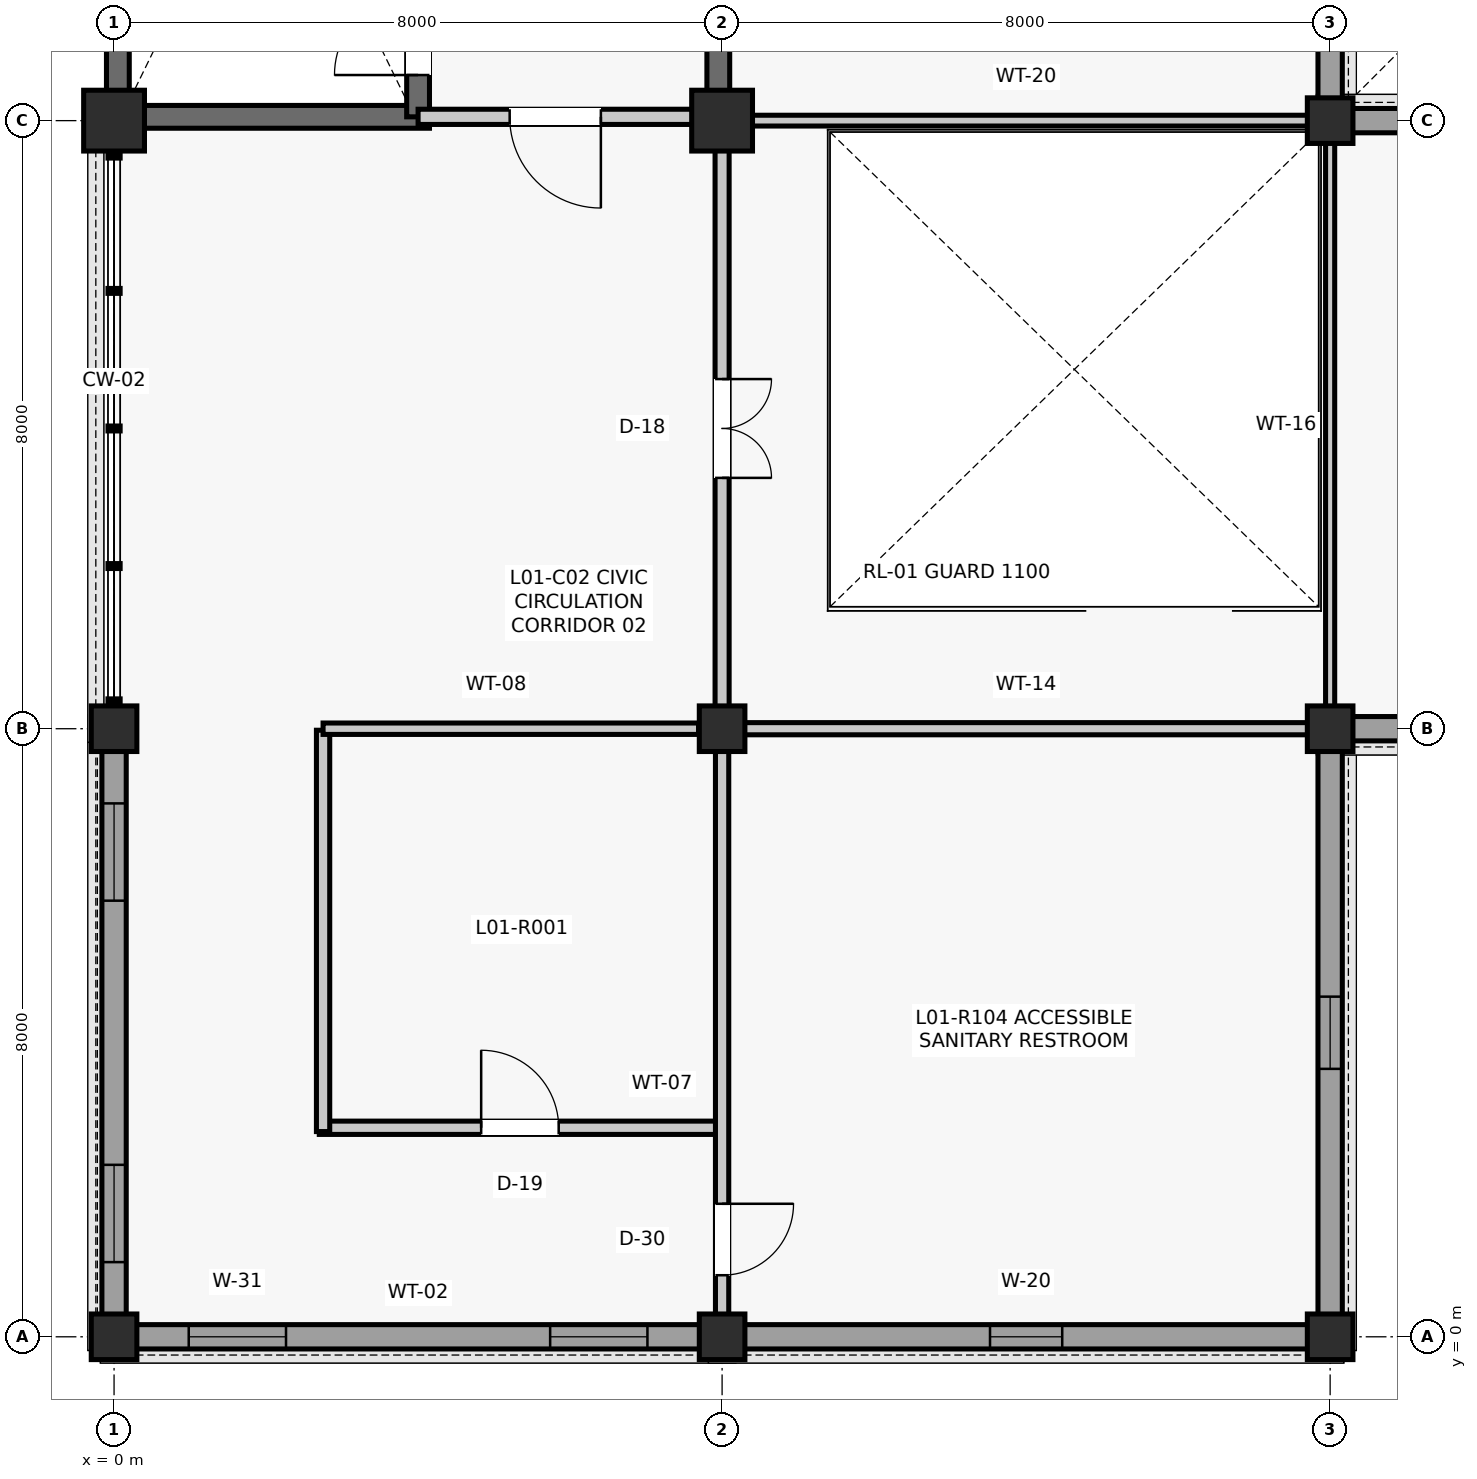
"""IFC4 building model, lengths in metres.
Left out: names, types, materials, properties, quantities, classifications, styles, units other than length and angle.
Written with IfcOpenShell. Run it as: python <this file> out.ifc"""

import sys

from ifc_helpers import new_model, si_unit, direction, frame, frame_2d, origin, origin_2d, place, context, subcontext, project, spatial, rectangle, extrude, element, fill, save


model = new_model("IFC4")
c1 = context("Model", 3, precision=1e-05, world=origin(), true_north=direction((0.0, 1.0)))
c2 = subcontext(c1, "Body", "Model", "MODEL_VIEW")
j1 = project(units=[si_unit("LENGTHUNIT", "METRE"), si_unit("PLANEANGLEUNIT", "RADIAN")], contexts=[c1])
p1 = place(None, origin())
s1 = spatial("IfcSite", under=j1, at=p1, CompositionType="ELEMENT")
p2 = place(p1, origin())
s2 = spatial("IfcBuilding", under=s1, at=p2, CompositionType="ELEMENT")
p3 = place(p2, frame((0.0, 0.0, 5.28)))
s3 = spatial("IfcBuildingStorey", under=s2, at=p3, CompositionType="ELEMENT", Elevation=5.28)
for number, where, z_axis, x_axis in (
    (1, (0.0, 0.0, 0.0), (0.0, 0.0, 1.0), (1.0, 0.0, 0.0)),
    (2, (0.0, 8.0, 0.0), (0.0, 0.0, 1.0), (1.0, 0.0, 0.0)),
):
    element("IfcColumn", number, at=place(p3, frame(where, z_axis=z_axis, x_axis=x_axis)), inside=s3, PredefinedType="COLUMN", context=c2, shape_type="SweptSolid", body=[
        extrude(rectangle(XDim=0.6, YDim=0.6, at=origin_2d()), origin(), (0.0, 0.0, 1.0), 4.62),
    ])
p4 = place(p3, frame((0.0, 16.0, 0.0), z_axis=(0.0, 0.0, 1.0), x_axis=(1.0, 0.0, 0.0)))
e3 = element("IfcColumn", 3, at=p4, inside=s3, PredefinedType="COLUMN", context=c2, shape_type="SweptSolid", body=[
    extrude(rectangle(XDim=0.8, YDim=0.8, at=origin_2d()), origin(), (0.0, 0.0, 1.0), 4.62),
])
for number, where, z_axis, x_axis in (
    (4, (8.0, 0.0, 0.0), (0.0, 0.0, 1.0), (1.0, 0.0, 0.0)),
    (5, (8.0, 8.0, 0.0), (0.0, 0.0, 1.0), (1.0, 0.0, 0.0)),
):
    element("IfcColumn", number, at=place(p3, frame(where, z_axis=z_axis, x_axis=x_axis)), inside=s3, PredefinedType="COLUMN", context=c2, shape_type="SweptSolid", body=[
        extrude(rectangle(XDim=0.6, YDim=0.6, at=origin_2d()), origin(), (0.0, 0.0, 1.0), 4.62),
    ])
p5 = place(p3, frame((8.0, 16.0, 0.0), z_axis=(0.0, 0.0, 1.0), x_axis=(1.0, 0.0, 0.0)))
e6 = element("IfcColumn", 6, at=p5, inside=s3, PredefinedType="COLUMN", context=c2, shape_type="SweptSolid", body=[
    extrude(rectangle(XDim=0.8, YDim=0.8, at=origin_2d()), origin(), (0.0, 0.0, 1.0), 4.62),
])
for number, where, z_axis, x_axis in (
    (7, (16.0, 0.0, 0.0), (0.0, 0.0, 1.0), (1.0, 0.0, 0.0)),
    (8, (16.0, 8.0, 0.0), (0.0, 0.0, 1.0), (1.0, 0.0, 0.0)),
    (9, (16.0, 16.0, 0.0), (0.0, 0.0, 1.0), (1.0, 0.0, 0.0)),
):
    element("IfcColumn", number, at=place(p3, frame(where, z_axis=z_axis, x_axis=x_axis)), inside=s3, PredefinedType="COLUMN", context=c2, shape_type="SweptSolid", body=[
        extrude(rectangle(XDim=0.6, YDim=0.6, at=origin_2d()), origin(), (0.0, 0.0, 1.0), 4.62),
    ])
p6 = place(p3, frame((0.285, 0.0, 0.0), z_axis=(0.0, 0.0, 1.0), x_axis=(1.0, 0.0, 0.0)))
e10 = element("IfcWall", 10, at=p6, inside=s3, PredefinedType="SOLIDWALL", context=c2, shape_type="SweptSolid", body=[
    extrude(rectangle(XDim=7.43, YDim=0.32, at=frame_2d((3.715, 0.0))), origin(), (0.0, 0.0, 1.0), 3.974),
])
p7 = place(p6, frame((0.698, 0.0, 0.95)))
e11 = element("IfcOpeningElement", 11, at=p7, cuts=e10, PredefinedType="OPENING", context=c2, shape_type="SweptSolid", body=[
    extrude(rectangle(XDim=1.28, YDim=1.72, at=frame_2d((0.64, 0.86))), frame((0.0, 0.17, 0.0), z_axis=(0.0, -1.0, 0.0), x_axis=(1.0, 0.0, 0.0)), (0.0, 0.0, 1.0), 0.34),
])
p8 = place(p6, frame((5.453, 0.0, 0.95)))
e12 = element("IfcOpeningElement", 12, at=p8, cuts=e10, PredefinedType="OPENING", context=c2, shape_type="SweptSolid", body=[
    extrude(rectangle(XDim=1.28, YDim=1.72, at=frame_2d((0.64, 0.86))), frame((0.0, 0.17, 0.0), z_axis=(0.0, -1.0, 0.0), x_axis=(1.0, 0.0, 0.0)), (0.0, 0.0, 1.0), 0.34),
])
p9 = place(p3, frame((0.0, 0.285, 0.0), z_axis=(0.0, 0.0, 1.0), x_axis=(0.0, 1.0, 0.0)))
e13 = element("IfcWall", 13, at=p9, inside=s3, PredefinedType="SOLIDWALL", context=c2, shape_type="SweptSolid", body=[
    extrude(rectangle(XDim=7.43, YDim=0.32, at=frame_2d((3.715, 0.0))), origin(), (0.0, 0.0, 1.0), 3.974),
])
p10 = place(p9, frame((0.698, 0.0, 0.95)))
e14 = element("IfcOpeningElement", 14, at=p10, cuts=e13, PredefinedType="OPENING", context=c2, shape_type="SweptSolid", body=[
    extrude(rectangle(XDim=1.28, YDim=1.72, at=frame_2d((0.64, 0.86))), frame((0.0, 0.17, 0.0), z_axis=(0.0, -1.0, 0.0), x_axis=(1.0, 0.0, 0.0)), (0.0, 0.0, 1.0), 0.34),
])
p11 = place(p9, frame((5.453, 0.0, 0.95)))
e15 = element("IfcOpeningElement", 15, at=p11, cuts=e13, PredefinedType="OPENING", context=c2, shape_type="SweptSolid", body=[
    extrude(rectangle(XDim=1.28, YDim=1.72, at=frame_2d((0.64, 0.86))), frame((0.0, 0.17, 0.0), z_axis=(0.0, -1.0, 0.0), x_axis=(1.0, 0.0, 0.0)), (0.0, 0.0, 1.0), 0.34),
])
p12 = place(p3, frame((8.285, 0.0, 0.0), z_axis=(0.0, 0.0, 1.0), x_axis=(1.0, 0.0, 0.0)))
e16 = element("IfcWall", 16, at=p12, inside=s3, PredefinedType="SOLIDWALL", context=c2, shape_type="SweptSolid", body=[
    extrude(rectangle(XDim=7.43, YDim=0.32, at=frame_2d((3.715, 0.0))), origin(), (0.0, 0.0, 1.0), 3.914),
])
p13 = place(p12, frame((3.24, 0.0, 1.35)))
e17 = element("IfcOpeningElement", 17, at=p13, cuts=e16, PredefinedType="OPENING", context=c2, shape_type="SweptSolid", body=[
    extrude(rectangle(XDim=0.95, YDim=1.4, at=frame_2d((0.475, 0.7))), frame((0.0, 0.17, 0.0), z_axis=(0.0, -1.0, 0.0), x_axis=(1.0, 0.0, 0.0)), (0.0, 0.0, 1.0), 0.34),
])
p14 = place(p3, frame((16.0, 0.285, 0.0), z_axis=(0.0, 0.0, 1.0), x_axis=(0.0, 1.0, 0.0)))
e18 = element("IfcWall", 18, at=p14, inside=s3, PredefinedType="SOLIDWALL", context=c2, shape_type="SweptSolid", body=[
    extrude(rectangle(XDim=7.43, YDim=0.32, at=frame_2d((3.715, 0.0))), origin(), (0.0, 0.0, 1.0), 3.977),
])
p15 = place(p14, frame((3.24, 0.0, 1.35)))
e19 = element("IfcOpeningElement", 19, at=p15, cuts=e18, PredefinedType="OPENING", context=c2, shape_type="SweptSolid", body=[
    extrude(rectangle(XDim=0.95, YDim=1.4, at=frame_2d((0.475, 0.7))), frame((0.0, 0.17, 0.0), z_axis=(0.0, -1.0, 0.0), x_axis=(1.0, 0.0, 0.0)), (0.0, 0.0, 1.0), 0.34),
])
p16 = place(p3, frame((16.0, 16.285, 0.0), z_axis=(0.0, 0.0, 1.0), x_axis=(0.0, 1.0, 0.0)))
e20 = element("IfcWall", 20, at=p16, inside=s3, PredefinedType="SOLIDWALL", context=c2, shape_type="SweptSolid", body=[
    extrude(rectangle(XDim=7.43, YDim=0.32, at=frame_2d((3.715, 0.0))), origin(), (0.0, 0.0, 1.0), 3.974),
])
p17 = place(p16, frame((2.74, 0.0, 0.9)))
e21 = element("IfcOpeningElement", 21, at=p17, cuts=e20, PredefinedType="OPENING", context=c2, shape_type="SweptSolid", body=[
    extrude(rectangle(XDim=1.95, YDim=2.45, at=frame_2d((0.975, 1.225))), frame((0.0, 0.17, 0.0), z_axis=(0.0, -1.0, 0.0), x_axis=(1.0, 0.0, 0.0)), (0.0, 0.0, 1.0), 0.34),
])
p18 = place(p3, frame((16.285, 8.0, 0.0), z_axis=(0.0, 0.0, 1.0), x_axis=(1.0, 0.0, 0.0)))
e22 = element("IfcWall", 22, at=p18, inside=s3, PredefinedType="SOLIDWALL", context=c2, shape_type="SweptSolid", body=[
    extrude(rectangle(XDim=7.43, YDim=0.32, at=frame_2d((3.715, 0.0))), origin(), (0.0, 0.0, 1.0), 3.91),
])
p19 = place(p18, frame((2.74, 0.0, 0.9)))
e23 = element("IfcOpeningElement", 23, at=p19, cuts=e22, PredefinedType="OPENING", context=c2, shape_type="SweptSolid", body=[
    extrude(rectangle(XDim=1.95, YDim=2.45, at=frame_2d((0.975, 1.225))), frame((0.0, 0.17, 0.0), z_axis=(0.0, -1.0, 0.0), x_axis=(1.0, 0.0, 0.0)), (0.0, 0.0, 1.0), 0.34),
])
p20 = place(p3, frame((16.285, 16.0, 0.0), z_axis=(0.0, 0.0, 1.0), x_axis=(1.0, 0.0, 0.0)))
e24 = element("IfcWall", 24, at=p20, inside=s3, PredefinedType="SOLIDWALL", context=c2, shape_type="SweptSolid", body=[
    extrude(rectangle(XDim=7.43, YDim=0.32, at=frame_2d((3.715, 0.0))), origin(), (0.0, 0.0, 1.0), 3.974),
])
p21 = place(p20, frame((2.74, 0.0, 0.9)))
e25 = element("IfcOpeningElement", 25, at=p21, cuts=e24, PredefinedType="OPENING", context=c2, shape_type="SweptSolid", body=[
    extrude(rectangle(XDim=1.95, YDim=2.45, at=frame_2d((0.975, 1.225))), frame((0.0, 0.17, 0.0), z_axis=(0.0, -1.0, 0.0), x_axis=(1.0, 0.0, 0.0)), (0.0, 0.0, 1.0), 0.34),
])
for number, where, z_axis, x_axis in (
    (26, (0.05, 16.29, 0.0), (0.0, 0.0, 1.0), (0.0, 1.0, 0.0)),
    (27, (7.95, 16.29, 0.0), (0.0, 0.0, 1.0), (0.0, 1.0, 0.0)),
):
    element("IfcWall", number, at=place(p3, frame(where, z_axis=z_axis, x_axis=x_axis)), inside=s3, PredefinedType="SHEAR", context=c2, shape_type="SweptSolid", body=[
        extrude(rectangle(XDim=7.42, YDim=0.3, at=frame_2d((3.71, 0.0))), origin(), (0.0, 0.0, 1.0), 4.335),
    ])
p22 = place(p3, frame((0.29, 16.05, 0.0), z_axis=(0.0, 0.0, 1.0), x_axis=(1.0, 0.0, 0.0)))
e28 = element("IfcWall", 28, at=p22, inside=s3, PredefinedType="SHEAR", context=c2, shape_type="SweptSolid", body=[
    extrude(rectangle(XDim=3.86, YDim=0.3, at=frame_2d((1.93, 0.0))), origin(), (0.0, 0.0, 1.0), 4.335),
])
p23 = place(p3, frame((4.0, 16.05, 0.0), z_axis=(0.0, 0.0, 1.0), x_axis=(0.0, 1.0, 0.0)))
e29 = element("IfcWall", 29, at=p23, inside=s3, PredefinedType="SHEAR", context=c2, shape_type="SweptSolid", body=[
    extrude(rectangle(XDim=7.9, YDim=0.3, at=frame_2d((3.95, 0.0))), origin(), (0.0, 0.0, 1.0), 4.335),
])
p24 = place(p23, frame((0.55, 0.0, 0.0)))
e30 = element("IfcOpeningElement", 30, at=p24, cuts=e29, PredefinedType="OPENING", context=c2, shape_type="SweptSolid", body=[
    extrude(rectangle(XDim=1.1, YDim=2.15, at=frame_2d((0.55, 1.075))), frame((0.0, 0.16, 0.0), z_axis=(0.0, -1.0, 0.0), x_axis=(1.0, 0.0, 0.0)), (0.0, 0.0, 1.0), 0.32),
])
p25 = place(p3, frame((4.0, 16.05, 0.0), z_axis=(0.0, 0.0, 1.0), x_axis=(1.0, 0.0, 0.0)))
e31 = element("IfcWall", 31, at=p25, inside=s3, PredefinedType="PARTITIONING", context=c2, shape_type="SweptSolid", body=[
    extrude(rectangle(XDim=3.61, YDim=0.2, at=frame_2d((1.805, 0.0))), origin(), (0.0, 0.0, 1.0), 3.771),
])
p26 = place(p25, frame((1.205, 0.0, 0.0)))
e32 = element("IfcOpeningElement", 32, at=p26, cuts=e31, PredefinedType="OPENING", context=c2, shape_type="SweptSolid", body=[
    extrude(rectangle(XDim=1.2, YDim=2.15, at=frame_2d((0.6, 1.075))), frame((0.0, 0.11, 0.0), z_axis=(0.0, -1.0, 0.0), x_axis=(1.0, 0.0, 0.0)), (0.0, 0.0, 1.0), 0.22),
])
p27 = place(p3, frame((2.7, 2.75, 0.0), z_axis=(0.0, 0.0, 1.0), x_axis=(1.0, 0.0, 0.0)))
e33 = element("IfcWall", 33, at=p27, inside=s3, PredefinedType="PARTITIONING", context=c2, shape_type="SweptSolid", body=[
    extrude(rectangle(XDim=5.28, YDim=0.175, at=frame_2d((2.64, 0.0))), origin(), (0.0, 0.0, 1.0), 3.857),
])
p28 = place(p27, frame((2.13, 0.0, 0.0)))
e34 = element("IfcOpeningElement", 34, at=p28, cuts=e33, PredefinedType="OPENING", context=c2, shape_type="SweptSolid", body=[
    extrude(rectangle(XDim=1.02, YDim=2.2, at=frame_2d((0.51, 1.1))), frame((0.0, 0.097, 0.0), z_axis=(0.0, -1.0, 0.0), x_axis=(1.0, 0.0, 0.0)), (0.0, 0.0, 1.0), 0.195),
])
p29 = place(p3, frame((2.75, 2.7, 0.0), z_axis=(0.0, 0.0, 1.0), x_axis=(0.0, 1.0, 0.0)))
e35 = element("IfcWall", 35, at=p29, inside=s3, PredefinedType="PARTITIONING", context=c2, shape_type="SweptSolid", body=[
    extrude(rectangle(XDim=5.28, YDim=0.175, at=frame_2d((2.64, 0.0))), origin(), (0.0, 0.0, 1.0), 3.787),
])
p30 = place(p3, frame((2.75, 8.0, 0.0), z_axis=(0.0, 0.0, 1.0), x_axis=(1.0, 0.0, 0.0)))
e36 = element("IfcWall", 36, at=p30, inside=s3, PredefinedType="PARTITIONING", context=c2, shape_type="SweptSolid", body=[
    extrude(rectangle(XDim=4.94, YDim=0.15, at=frame_2d((2.47, 0.0))), origin(), (0.0, 0.0, 1.0), 3.787),
])
p31 = place(p3, frame((8.0, 0.29, 0.0), z_axis=(0.0, 0.0, 1.0), x_axis=(0.0, 1.0, 0.0)))
e37 = element("IfcWall", 37, at=p31, inside=s3, PredefinedType="PARTITIONING", context=c2, shape_type="SweptSolid", body=[
    extrude(rectangle(XDim=7.42, YDim=0.175, at=frame_2d((3.71, 0.0))), origin(), (0.0, 0.0, 1.0), 3.857),
])
p32 = place(p31, frame((0.52, 0.0, 0.0)))
e38 = element("IfcOpeningElement", 38, at=p32, cuts=e37, PredefinedType="OPENING", context=c2, shape_type="SweptSolid", body=[
    extrude(rectangle(XDim=0.94, YDim=2.12, at=frame_2d((0.47, 1.06))), frame((0.0, 0.097, 0.0), z_axis=(0.0, -1.0, 0.0), x_axis=(1.0, 0.0, 0.0)), (0.0, 0.0, 1.0), 0.195),
])
p33 = place(p3, frame((8.0, 8.29, 0.0), z_axis=(0.0, 0.0, 1.0), x_axis=(0.0, 1.0, 0.0)))
e39 = element("IfcWall", 39, at=p33, inside=s3, PredefinedType="PARTITIONING", context=c2, shape_type="SweptSolid", body=[
    extrude(rectangle(XDim=7.32, YDim=0.185, at=frame_2d((3.66, 0.0))), origin(), (0.0, 0.0, 1.0), 3.781),
])
p34 = place(p33, frame((3.01, 0.0, 0.0)))
e40 = element("IfcOpeningElement", 40, at=p34, cuts=e39, PredefinedType="OPENING", context=c2, shape_type="SweptSolid", body=[
    extrude(rectangle(XDim=1.3, YDim=2.2, at=frame_2d((0.65, 1.1))), frame((0.0, 0.103, 0.0), z_axis=(0.0, -1.0, 0.0), x_axis=(1.0, 0.0, 0.0)), (0.0, 0.0, 1.0), 0.205),
])
p35 = place(p3, frame((8.29, 8.0, 0.0), z_axis=(0.0, 0.0, 1.0), x_axis=(1.0, 0.0, 0.0)))
e41 = element("IfcWall", 41, at=p35, inside=s3, PredefinedType="PARTITIONING", context=c2, shape_type="SweptSolid", body=[
    extrude(rectangle(XDim=7.42, YDim=0.16, at=frame_2d((3.71, 0.0))), origin(), (0.0, 0.0, 1.0), 3.771),
])
p36 = place(p3, frame((16.0, 8.29, 0.0), z_axis=(0.0, 0.0, 1.0), x_axis=(0.0, 1.0, 0.0)))
e42 = element("IfcWall", 42, at=p36, inside=s3, PredefinedType="PARTITIONING", context=c2, shape_type="SweptSolid", body=[
    extrude(rectangle(XDim=7.42, YDim=0.12, at=frame_2d((3.71, 0.0))), origin(), (0.0, 0.0, 1.0), 3.851),
])
p37 = place(p3, frame((8.39, 16.0, 0.0), z_axis=(0.0, 0.0, 1.0), x_axis=(1.0, 0.0, 0.0)))
e43 = element("IfcWall", 43, at=p37, inside=s3, PredefinedType="PARTITIONING", context=c2, shape_type="SweptSolid", body=[
    extrude(rectangle(XDim=7.32, YDim=0.142, at=frame_2d((3.66, 0.0))), origin(), (0.0, 0.0, 1.0), 3.781),
])
p38 = place(p7, origin())
e44 = element("IfcWindow", 44, at=p38, inside=s3, PartitioningType="SINGLE_PANEL", PredefinedType="WINDOW", context=c2, shape_type="SweptSolid", body=[
    extrude(rectangle(XDim=1.28, YDim=1.72, at=frame_2d((0.64, 0.86))), frame((0.0, 0.03, 0.0), z_axis=(0.0, -1.0, 0.0), x_axis=(1.0, 0.0, 0.0)), (0.0, 0.0, 1.0), 0.06),
])
fill(e11, e44)
p39 = place(p8, origin())
e45 = element("IfcWindow", 45, at=p39, inside=s3, PartitioningType="SINGLE_PANEL", PredefinedType="WINDOW", context=c2, shape_type="SweptSolid", body=[
    extrude(rectangle(XDim=1.28, YDim=1.72, at=frame_2d((0.64, 0.86))), frame((0.0, 0.03, 0.0), z_axis=(0.0, -1.0, 0.0), x_axis=(1.0, 0.0, 0.0)), (0.0, 0.0, 1.0), 0.06),
])
fill(e12, e45)
p40 = place(p10, origin())
e46 = element("IfcWindow", 46, at=p40, inside=s3, PartitioningType="SINGLE_PANEL", PredefinedType="WINDOW", context=c2, shape_type="SweptSolid", body=[
    extrude(rectangle(XDim=1.28, YDim=1.72, at=frame_2d((0.64, 0.86))), frame((0.0, 0.03, 0.0), z_axis=(0.0, -1.0, 0.0), x_axis=(1.0, 0.0, 0.0)), (0.0, 0.0, 1.0), 0.06),
])
fill(e14, e46)
p41 = place(p11, origin())
e47 = element("IfcWindow", 47, at=p41, inside=s3, PartitioningType="SINGLE_PANEL", PredefinedType="WINDOW", context=c2, shape_type="SweptSolid", body=[
    extrude(rectangle(XDim=1.28, YDim=1.72, at=frame_2d((0.64, 0.86))), frame((0.0, 0.03, 0.0), z_axis=(0.0, -1.0, 0.0), x_axis=(1.0, 0.0, 0.0)), (0.0, 0.0, 1.0), 0.06),
])
fill(e15, e47)
p42 = place(p13, origin())
e48 = element("IfcWindow", 48, at=p42, inside=s3, PartitioningType="SINGLE_PANEL", PredefinedType="WINDOW", context=c2, shape_type="SweptSolid", body=[
    extrude(rectangle(XDim=0.95, YDim=1.4, at=frame_2d((0.475, 0.7))), frame((0.0, 0.03, 0.0), z_axis=(0.0, -1.0, 0.0), x_axis=(1.0, 0.0, 0.0)), (0.0, 0.0, 1.0), 0.06),
])
fill(e17, e48)
p43 = place(p15, origin())
e49 = element("IfcWindow", 49, at=p43, inside=s3, PartitioningType="SINGLE_PANEL", PredefinedType="WINDOW", context=c2, shape_type="SweptSolid", body=[
    extrude(rectangle(XDim=0.95, YDim=1.4, at=frame_2d((0.475, 0.7))), frame((0.0, 0.03, 0.0), z_axis=(0.0, -1.0, 0.0), x_axis=(1.0, 0.0, 0.0)), (0.0, 0.0, 1.0), 0.06),
])
fill(e19, e49)
p44 = place(p24, origin())
e50 = element("IfcDoor", 50, at=p44, inside=s3, OperationType="SINGLE_SWING_LEFT", PredefinedType="DOOR", context=c2, shape_type="SweptSolid", body=[
    extrude(rectangle(XDim=1.1, YDim=2.15, at=frame_2d((0.55, 1.075))), frame((0.0, 0.025, 0.0), z_axis=(0.0, -1.0, 0.0), x_axis=(1.0, 0.0, 0.0)), (0.0, 0.0, 1.0), 0.05),
])
fill(e30, e50)
p45 = place(p26, frame((1.2, 0.0, 0.0), z_axis=(0.0, 0.0, 1.0), x_axis=(-1.0, 0.0, 0.0)))
e51 = element("IfcDoor", 51, at=p45, inside=s3, OperationType="SINGLE_SWING_RIGHT", PredefinedType="DOOR", context=c2, shape_type="SweptSolid", body=[
    extrude(rectangle(XDim=1.2, YDim=2.15, at=frame_2d((0.6, 1.075))), frame((0.0, 0.025, 0.0), z_axis=(0.0, -1.0, 0.0), x_axis=(1.0, 0.0, 0.0)), (0.0, 0.0, 1.0), 0.05),
])
fill(e32, e51)
p46 = place(p28, origin())
e52 = element("IfcDoor", 52, at=p46, inside=s3, OperationType="SINGLE_SWING_LEFT", PredefinedType="DOOR", context=c2, shape_type="SweptSolid", body=[
    extrude(rectangle(XDim=1.02, YDim=2.2, at=frame_2d((0.51, 1.1))), frame((0.0, 0.025, 0.0), z_axis=(0.0, -1.0, 0.0), x_axis=(1.0, 0.0, 0.0)), (0.0, 0.0, 1.0), 0.05),
])
fill(e34, e52)
p47 = place(p32, frame((0.94, 0.0, 0.0), z_axis=(0.0, 0.0, 1.0), x_axis=(-1.0, 0.0, 0.0)))
e53 = element("IfcDoor", 53, at=p47, inside=s3, OperationType="SINGLE_SWING_RIGHT", PredefinedType="DOOR", context=c2, shape_type="SweptSolid", body=[
    extrude(rectangle(XDim=0.94, YDim=2.12, at=frame_2d((0.47, 1.06))), frame((0.0, 0.025, 0.0), z_axis=(0.0, -1.0, 0.0), x_axis=(1.0, 0.0, 0.0)), (0.0, 0.0, 1.0), 0.05),
])
fill(e38, e53)
p48 = place(p34, frame((1.3, 0.0, 0.0), z_axis=(0.0, 0.0, 1.0), x_axis=(-1.0, 0.0, 0.0)))
e54 = element("IfcDoor", 54, at=p48, inside=s3, OperationType="DOUBLE_DOOR_SINGLE_SWING", PredefinedType="DOOR", context=c2, shape_type="SweptSolid", body=[
    extrude(rectangle(XDim=1.3, YDim=2.2, at=frame_2d((0.65, 1.1))), frame((0.0, 0.025, 0.0), z_axis=(0.0, -1.0, 0.0), x_axis=(1.0, 0.0, 0.0)), (0.0, 0.0, 1.0), 0.05),
])
fill(e40, e54)
save(model, sys.argv[1])
